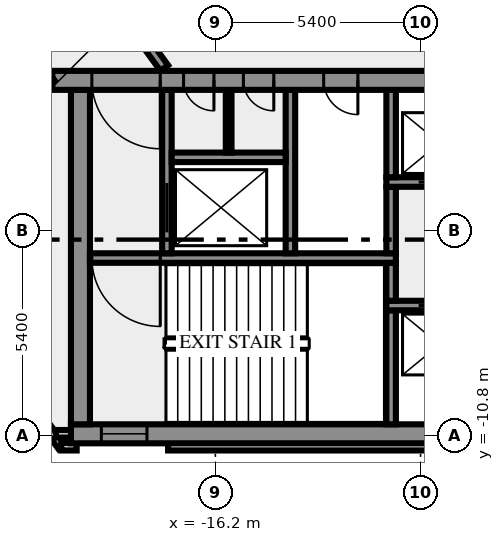
"""IFC4 building model, lengths in metres.
Left out: names, types, materials, properties, quantities, classifications, styles, units other than length and angle.
Written with IfcOpenShell. Run it as: python <this file> out.ifc"""

import sys

from ifc_helpers import new_model, si_unit, direction, frame, frame_2d, origin, place, context, subcontext, project, spatial, rectangle, extrude, element, fill, save


model = new_model("IFC4")
c1 = context("Model", 3, precision=1e-05, world=origin(), true_north=direction((0.0, 1.0)))
c2 = subcontext(c1, "Body", "Model", "MODEL_VIEW")
j1 = project(units=[si_unit("LENGTHUNIT", "METRE"), si_unit("PLANEANGLEUNIT", "RADIAN")], contexts=[c1])
p1 = place(None, origin())
s1 = spatial("IfcSite", under=j1, at=p1, CompositionType="ELEMENT")
p2 = place(p1, origin())
s2 = spatial("IfcBuilding", under=s1, at=p2, CompositionType="ELEMENT")
p3 = place(p2, frame((0.0, 0.0, 20.5)))
s3 = spatial("IfcBuildingStorey", under=s2, at=p3, CompositionType="ELEMENT", Elevation=20.5)
p4 = place(p3, frame((-21.833, -8.909, 0.0), z_axis=(0.0, 0.0, 1.0), x_axis=(0.587766567315, -0.809030569476, 0.0)))
e1 = element("IfcWall", 1, at=p4, inside=s3, PredefinedType="SOLIDWALL", context=c2, shape_type="SweptSolid", body=[
    extrude(rectangle(XDim=2.688, YDim=0.2, at=frame_2d((1.344, 0.0))), origin(), (0.0, 0.0, 1.0), 3.9),
])
p5 = place(p3, frame((-20.256, -11.088, 0.0), z_axis=(0.0, 0.0, 1.0), x_axis=(1.0, 0.0, 0.0)))
e2 = element("IfcWall", 2, at=p5, inside=s3, PredefinedType="SOLIDWALL", context=c2, shape_type="SweptSolid", body=[
    extrude(rectangle(XDim=0.406, YDim=0.2, at=frame_2d((0.203, 0.0))), origin(), (0.0, 0.0, 1.0), 3.9),
])
p6 = place(p3, frame((-17.444, -11.088, 0.0), z_axis=(0.0, 0.0, 1.0), x_axis=(1.0, 0.0, 0.0)))
e3 = element("IfcWall", 3, at=p6, inside=s3, PredefinedType="SOLIDWALL", context=c2, shape_type="SweptSolid", body=[
    extrude(rectangle(XDim=34.888, YDim=0.2, at=frame_2d((17.444, 0.0))), origin(), (0.0, 0.0, 1.0), 3.9),
])
p7 = place(p3, frame((-19.98, -10.75, 0.0), z_axis=(0.0, 0.0, 1.0), x_axis=(-1.0, 0.0, 0.0)))
e4 = element("IfcWall", 4, at=p7, inside=s3, PredefinedType="SOLIDWALL", context=c2, shape_type="SweptSolid", body=[
    extrude(rectangle(XDim=0.417, YDim=0.2, at=frame_2d((0.208, 0.0))), origin(), (0.0, 0.0, 1.0), 3.9),
])
p8 = place(p3, frame((-20.0, -10.75, 0.0), z_axis=(0.0, 0.0, 1.0), x_axis=(1.0, 0.0, 0.0)))
e5 = element("IfcWall", 5, at=p8, inside=s3, PredefinedType="SHEAR", context=c2, shape_type="SweptSolid", body=[
    extrude(rectangle(XDim=40.0, YDim=0.5, at=frame_2d((20.0, 0.0))), origin(), (0.0, 0.0, 1.0), 3.9),
])
p9 = place(p8, frame((0.8, 0.0, 1.0)))
e6 = element("IfcOpeningElement", 6, at=p9, cuts=e5, PredefinedType="OPENING", context=c2, shape_type="SweptSolid", body=[
    extrude(rectangle(XDim=1.2, YDim=1.2, at=frame_2d((0.6, 0.6))), frame((0.0, 0.26, 0.0), z_axis=(0.0, -1.0, 0.0), x_axis=(1.0, 0.0, 0.0)), (0.0, 0.0, 1.0), 0.52),
])
p10 = place(p8, frame((38.0, 0.0, 1.0)))
e7 = element("IfcOpeningElement", 7, at=p10, cuts=e5, PredefinedType="OPENING", context=c2, shape_type="SweptSolid", body=[
    extrude(rectangle(XDim=1.2, YDim=1.2, at=frame_2d((0.6, 0.6))), frame((0.0, 0.26, 0.0), z_axis=(0.0, -1.0, 0.0), x_axis=(1.0, 0.0, 0.0)), (0.0, 0.0, 1.0), 0.52),
])
p11 = place(p3, frame((-19.75, -10.5, 0.0), z_axis=(0.0, 0.0, 1.0), x_axis=(0.0, 1.0, 0.0)))
e8 = element("IfcWall", 8, at=p11, inside=s3, PredefinedType="SHEAR", context=c2, shape_type="SweptSolid", body=[
    extrude(rectangle(XDim=8.8, YDim=0.5, at=frame_2d((4.4, 0.0))), origin(), (0.0, 0.0, 1.0), 3.9),
])
p12 = place(p3, frame((-11.575, -10.5, 0.0), z_axis=(0.0, 0.0, 1.0), x_axis=(0.0, 1.0, 0.0)))
e9 = element("IfcWall", 9, at=p12, inside=s3, PredefinedType="SHEAR", context=c2, shape_type="SweptSolid", body=[
    extrude(rectangle(XDim=3.0, YDim=0.25, at=frame_2d((1.5, 0.0))), origin(), (0.0, 0.0, 1.0), 3.9),
])
p13 = place(p3, frame((11.7, -7.375, 0.0), z_axis=(0.0, 0.0, 1.0), x_axis=(-1.0, 0.0, 0.0)))
e10 = element("IfcWall", 10, at=p13, inside=s3, PredefinedType="SHEAR", context=c2, shape_type="SweptSolid", body=[
    extrude(rectangle(XDim=23.4, YDim=0.25, at=frame_2d((11.7, 0.0))), origin(), (0.0, 0.0, 1.0), 3.9),
])
p14 = place(p13, frame((21.45, 0.0, 0.0)))
e11 = element("IfcOpeningElement", 11, at=p14, cuts=e10, PredefinedType="OPENING", context=c2, shape_type="SweptSolid", body=[
    extrude(rectangle(XDim=1.1, YDim=2.1, at=frame_2d((0.55, 1.05))), frame((0.0, 0.135, 0.0), z_axis=(0.0, -1.0, 0.0), x_axis=(1.0, 0.0, 0.0)), (0.0, 0.0, 1.0), 0.27),
])
p15 = place(p13, frame((18.95, 0.0, 0.0)))
e12 = element("IfcOpeningElement", 12, at=p15, cuts=e10, PredefinedType="OPENING", context=c2, shape_type="SweptSolid", body=[
    extrude(rectangle(XDim=1.1, YDim=2.1, at=frame_2d((0.55, 1.05))), frame((0.0, 0.135, 0.0), z_axis=(0.0, -1.0, 0.0), x_axis=(1.0, 0.0, 0.0)), (0.0, 0.0, 1.0), 0.27),
])
p16 = place(p13, frame((16.45, 0.0, 0.0)))
e13 = element("IfcOpeningElement", 13, at=p16, cuts=e10, PredefinedType="OPENING", context=c2, shape_type="SweptSolid", body=[
    extrude(rectangle(XDim=1.1, YDim=2.1, at=frame_2d((0.55, 1.05))), frame((0.0, 0.135, 0.0), z_axis=(0.0, -1.0, 0.0), x_axis=(1.0, 0.0, 0.0)), (0.0, 0.0, 1.0), 0.27),
])
p17 = place(p13, frame((14.5, 0.0, 0.0)))
e14 = element("IfcOpeningElement", 14, at=p17, cuts=e10, PredefinedType="OPENING", context=c2, shape_type="SweptSolid", body=[
    extrude(rectangle(XDim=0.9, YDim=2.1, at=frame_2d((0.45, 1.05))), frame((0.0, 0.135, 0.0), z_axis=(0.0, -1.0, 0.0), x_axis=(1.0, 0.0, 0.0)), (0.0, 0.0, 1.0), 0.27),
])
p18 = place(p13, frame((12.95, 0.0, 0.0)))
e15 = element("IfcOpeningElement", 15, at=p18, cuts=e10, PredefinedType="OPENING", context=c2, shape_type="SweptSolid", body=[
    extrude(rectangle(XDim=0.9, YDim=2.1, at=frame_2d((0.45, 1.05))), frame((0.0, 0.135, 0.0), z_axis=(0.0, -1.0, 0.0), x_axis=(1.0, 0.0, 0.0)), (0.0, 0.0, 1.0), 0.27),
])
p19 = place(p13, frame((11.475, 0.0, 0.0)))
e16 = element("IfcOpeningElement", 16, at=p19, cuts=e10, PredefinedType="OPENING", context=c2, shape_type="SweptSolid", body=[
    extrude(rectangle(XDim=0.9, YDim=2.1, at=frame_2d((0.45, 1.05))), frame((0.0, 0.135, 0.0), z_axis=(0.0, -1.0, 0.0), x_axis=(1.0, 0.0, 0.0)), (0.0, 0.0, 1.0), 0.27),
])
p20 = place(p13, frame((10.45, 0.0, 0.0)))
e17 = element("IfcOpeningElement", 17, at=p20, cuts=e10, PredefinedType="OPENING", context=c2, shape_type="SweptSolid", body=[
    extrude(rectangle(XDim=0.5, YDim=2.1, at=frame_2d((0.25, 1.05))), frame((0.0, 0.135, 0.0), z_axis=(0.0, -1.0, 0.0), x_axis=(1.0, 0.0, 0.0)), (0.0, 0.0, 1.0), 0.27),
])
p21 = place(p3, frame((-11.575, -7.25, 0.0), z_axis=(0.0, 0.0, 1.0), x_axis=(0.0, 1.0, 0.0)))
e18 = element("IfcWall", 18, at=p21, inside=s3, PredefinedType="SHEAR", context=c2, shape_type="SweptSolid", body=[
    extrude(rectangle(XDim=1.0, YDim=0.25, at=frame_2d((0.5, 0.0))), origin(), (0.0, 0.0, 1.0), 3.9),
])
p22 = place(p3, frame((-11.45, -6.125, 0.0), z_axis=(0.0, 0.0, 1.0), x_axis=(-1.0, 0.0, 0.0)))
e19 = element("IfcWall", 19, at=p22, inside=s3, PredefinedType="SHEAR", context=c2, shape_type="SweptSolid", body=[
    extrude(rectangle(XDim=8.05, YDim=0.25, at=frame_2d((4.025, 0.0))), origin(), (0.0, 0.0, 1.0), 3.9),
])
p23 = place(p22, frame((6.2, 0.0, 0.0)))
e20 = element("IfcOpeningElement", 20, at=p23, cuts=e19, PredefinedType="OPENING", context=c2, shape_type="SweptSolid", body=[
    extrude(rectangle(XDim=1.8, YDim=2.1, at=frame_2d((0.9, 1.05))), frame((0.0, 0.135, 0.0), z_axis=(0.0, -1.0, 0.0), x_axis=(1.0, 0.0, 0.0)), (0.0, 0.0, 1.0), 0.27),
])
p24 = place(p3, frame((-17.475, -6.0, 0.0), z_axis=(0.0, 0.0, 1.0), x_axis=(0.0, 1.0, 0.0)))
e21 = element("IfcWall", 21, at=p24, inside=s3, PredefinedType="SHEAR", context=c2, shape_type="SweptSolid", body=[
    extrude(rectangle(XDim=4.3, YDim=0.25, at=frame_2d((2.15, 0.0))), origin(), (0.0, 0.0, 1.0), 3.9),
])
p25 = place(p24, frame((0.55, 0.0, 0.0)))
e22 = element("IfcOpeningElement", 22, at=p25, cuts=e21, PredefinedType="OPENING", context=c2, shape_type="SweptSolid", body=[
    extrude(rectangle(XDim=1.3, YDim=2.1, at=frame_2d((0.65, 1.05))), frame((0.0, 0.135, 0.0), z_axis=(0.0, -1.0, 0.0), x_axis=(1.0, 0.0, 0.0)), (0.0, 0.0, 1.0), 0.27),
])
p26 = place(p3, frame((-14.225, -6.0, 0.0), z_axis=(0.0, 0.0, 1.0), x_axis=(0.0, 1.0, 0.0)))
e23 = element("IfcWall", 23, at=p26, inside=s3, PredefinedType="SHEAR", context=c2, shape_type="SweptSolid", body=[
    extrude(rectangle(XDim=4.3, YDim=0.25, at=frame_2d((2.15, 0.0))), origin(), (0.0, 0.0, 1.0), 3.9),
])
p27 = place(p3, frame((-11.575, -6.0, 0.0), z_axis=(0.0, 0.0, 1.0), x_axis=(0.0, 1.0, 0.0)))
e24 = element("IfcWall", 24, at=p27, inside=s3, PredefinedType="SHEAR", context=c2, shape_type="SweptSolid", body=[
    extrude(rectangle(XDim=1.75, YDim=0.25, at=frame_2d((0.875, 0.0))), origin(), (0.0, 0.0, 1.0), 3.9),
])
p28 = place(p3, frame((-11.7, -4.125, 0.0), z_axis=(0.0, 0.0, 1.0), x_axis=(1.0, 0.0, 0.0)))
e25 = element("IfcWall", 25, at=p28, inside=s3, PredefinedType="SHEAR", context=c2, shape_type="SweptSolid", body=[
    extrude(rectangle(XDim=10.05, YDim=0.25, at=frame_2d((5.025, 0.0))), origin(), (0.0, 0.0, 1.0), 3.9),
])
p29 = place(p28, frame((0.85, 0.0, 0.0)))
e26 = element("IfcOpeningElement", 26, at=p29, cuts=e25, PredefinedType="OPENING", context=c2, shape_type="SweptSolid", body=[
    extrude(rectangle(XDim=1.1, YDim=2.1, at=frame_2d((0.55, 1.05))), frame((0.0, 0.135, 0.0), z_axis=(0.0, -1.0, 0.0), x_axis=(1.0, 0.0, 0.0)), (0.0, 0.0, 1.0), 0.27),
])
p30 = place(p28, frame((3.35, 0.0, 0.0)))
e27 = element("IfcOpeningElement", 27, at=p30, cuts=e25, PredefinedType="OPENING", context=c2, shape_type="SweptSolid", body=[
    extrude(rectangle(XDim=1.1, YDim=2.1, at=frame_2d((0.55, 1.05))), frame((0.0, 0.135, 0.0), z_axis=(0.0, -1.0, 0.0), x_axis=(1.0, 0.0, 0.0)), (0.0, 0.0, 1.0), 0.27),
])
p31 = place(p28, frame((5.85, 0.0, 0.0)))
e28 = element("IfcOpeningElement", 28, at=p31, cuts=e25, PredefinedType="OPENING", context=c2, shape_type="SweptSolid", body=[
    extrude(rectangle(XDim=1.1, YDim=2.1, at=frame_2d((0.55, 1.05))), frame((0.0, 0.135, 0.0), z_axis=(0.0, -1.0, 0.0), x_axis=(1.0, 0.0, 0.0)), (0.0, 0.0, 1.0), 0.27),
])
p32 = place(p3, frame((-11.575, -4.0, 0.0), z_axis=(0.0, 0.0, 1.0), x_axis=(0.0, 1.0, 0.0)))
e29 = element("IfcWall", 29, at=p32, inside=s3, PredefinedType="SHEAR", context=c2, shape_type="SweptSolid", body=[
    extrude(rectangle(XDim=2.3, YDim=0.25, at=frame_2d((1.15, 0.0))), origin(), (0.0, 0.0, 1.0), 3.9),
])
p33 = place(p3, frame((-17.35, -3.475, 0.0), z_axis=(0.0, 0.0, 1.0), x_axis=(1.0, 0.0, 0.0)))
e30 = element("IfcWall", 30, at=p33, inside=s3, PredefinedType="SHEAR", context=c2, shape_type="SweptSolid", body=[
    extrude(rectangle(XDim=3.0, YDim=0.25, at=frame_2d((1.5, 0.0))), origin(), (0.0, 0.0, 1.0), 3.9),
])
p34 = place(p3, frame((-15.85, -3.35, 0.0), z_axis=(0.0, 0.0, 1.0), x_axis=(0.0, 1.0, 0.0)))
e31 = element("IfcWall", 31, at=p34, inside=s3, PredefinedType="PARTITIONING", context=c2, shape_type="SweptSolid", body=[
    extrude(rectangle(XDim=1.65, YDim=0.15, at=frame_2d((0.825, 0.0))), origin(), (0.0, 0.0, 1.0), 3.9),
])
p35 = place(p3, frame((20.49, -1.45, 0.0), z_axis=(0.0, 0.0, 1.0), x_axis=(-1.0, 0.0, 0.0)))
e32 = element("IfcWall", 32, at=p35, inside=s3, PredefinedType="SHEAR", context=c2, shape_type="SweptSolid", body=[
    extrude(rectangle(XDim=40.98, YDim=0.5, at=frame_2d((20.49, 0.0))), origin(), (0.0, 0.0, 1.0), 3.9),
])
p36 = place(p35, frame((38.14, 0.0, 0.0)))
e33 = element("IfcOpeningElement", 33, at=p36, cuts=e32, PredefinedType="OPENING", context=c2, shape_type="SweptSolid", body=[
    extrude(rectangle(XDim=1.8, YDim=2.1, at=frame_2d((0.9, 1.05))), frame((0.0, 0.26, 0.0), z_axis=(0.0, -1.0, 0.0), x_axis=(1.0, 0.0, 0.0)), (0.0, 0.0, 1.0), 0.52),
])
p37 = place(p35, frame((36.728, 0.0, 0.0)))
e34 = element("IfcOpeningElement", 34, at=p37, cuts=e32, PredefinedType="OPENING", context=c2, shape_type="SweptSolid", body=[
    extrude(rectangle(XDim=0.8, YDim=2.1, at=frame_2d((0.4, 1.05))), frame((0.0, 0.26, 0.0), z_axis=(0.0, -1.0, 0.0), x_axis=(1.0, 0.0, 0.0)), (0.0, 0.0, 1.0), 0.52),
])
p38 = place(p35, frame((35.153, 0.0, 0.0)))
e35 = element("IfcOpeningElement", 35, at=p38, cuts=e32, PredefinedType="OPENING", context=c2, shape_type="SweptSolid", body=[
    extrude(rectangle(XDim=0.8, YDim=2.1, at=frame_2d((0.4, 1.05))), frame((0.0, 0.26, 0.0), z_axis=(0.0, -1.0, 0.0), x_axis=(1.0, 0.0, 0.0)), (0.0, 0.0, 1.0), 0.52),
])
p39 = place(p35, frame((32.94, 0.0, 0.0)))
e36 = element("IfcOpeningElement", 36, at=p39, cuts=e32, PredefinedType="OPENING", context=c2, shape_type="SweptSolid", body=[
    extrude(rectangle(XDim=0.9, YDim=2.1, at=frame_2d((0.45, 1.05))), frame((0.0, 0.26, 0.0), z_axis=(0.0, -1.0, 0.0), x_axis=(1.0, 0.0, 0.0)), (0.0, 0.0, 1.0), 0.52),
])
p40 = place(p35, frame((19.59, 0.0, 0.0)))
e37 = element("IfcOpeningElement", 37, at=p40, cuts=e32, PredefinedType="OPENING", context=c2, shape_type="SweptSolid", body=[
    extrude(rectangle(XDim=2.0, YDim=2.1, at=frame_2d((1.0, 1.05))), frame((0.0, 0.26, 0.0), z_axis=(0.0, -1.0, 0.0), x_axis=(1.0, 0.0, 0.0)), (0.0, 0.0, 1.0), 0.52),
])
p41 = place(p35, frame((7.14, 0.0, 0.0)))
e38 = element("IfcOpeningElement", 38, at=p41, cuts=e32, PredefinedType="OPENING", context=c2, shape_type="SweptSolid", body=[
    extrude(rectangle(XDim=0.9, YDim=2.1, at=frame_2d((0.45, 1.05))), frame((0.0, 0.26, 0.0), z_axis=(0.0, -1.0, 0.0), x_axis=(1.0, 0.0, 0.0)), (0.0, 0.0, 1.0), 0.52),
])
p42 = place(p35, frame((4.19, 0.0, 0.0)))
e39 = element("IfcOpeningElement", 39, at=p42, cuts=e32, PredefinedType="OPENING", context=c2, shape_type="SweptSolid", body=[
    extrude(rectangle(XDim=0.9, YDim=2.1, at=frame_2d((0.45, 1.05))), frame((0.0, 0.26, 0.0), z_axis=(0.0, -1.0, 0.0), x_axis=(1.0, 0.0, 0.0)), (0.0, 0.0, 1.0), 0.52),
])
p43 = place(p35, frame((1.04, 0.0, 0.0)))
e40 = element("IfcOpeningElement", 40, at=p43, cuts=e32, PredefinedType="OPENING", context=c2, shape_type="SweptSolid", body=[
    extrude(rectangle(XDim=1.8, YDim=2.1, at=frame_2d((0.9, 1.05))), frame((0.0, 0.26, 0.0), z_axis=(0.0, -1.0, 0.0), x_axis=(1.0, 0.0, 0.0)), (0.0, 0.0, 1.0), 0.52),
])
p44 = place(p3, frame((-20.531, -1.523, 0.0), z_axis=(0.0, 0.0, 1.0), x_axis=(-0.587784522481, 0.809017524614, 0.0)))
e41 = element("IfcWall", 41, at=p44, inside=s3, PredefinedType="SOLIDWALL", context=c2, shape_type="SweptSolid", body=[
    extrude(rectangle(XDim=49.912, YDim=0.25, at=frame_2d((24.956, 0.0))), origin(), (0.0, 0.0, 1.0), 3.9),
])
p45 = place(p44, frame((30.765, 0.0, 0.0)))
e42 = element("IfcOpeningElement", 42, at=p45, cuts=e41, PredefinedType="OPENING", context=c2, shape_type="SweptSolid", body=[
    extrude(rectangle(XDim=0.9, YDim=2.1, at=frame_2d((0.45, 1.05))), frame((0.0, 0.135, 0.0), z_axis=(0.0, -1.0, 0.0), x_axis=(1.0, 0.0, 0.0)), (0.0, 0.0, 1.0), 0.27),
])
p46 = place(p44, frame((0.533, 0.0, 0.0)))
e43 = element("IfcOpeningElement", 43, at=p46, cuts=e41, PredefinedType="OPENING", context=c2, shape_type="SweptSolid", body=[
    extrude(rectangle(XDim=0.9, YDim=2.1, at=frame_2d((0.45, 1.05))), frame((0.0, 0.135, 0.0), z_axis=(0.0, -1.0, 0.0), x_axis=(1.0, 0.0, 0.0)), (0.0, 0.0, 1.0), 0.27),
])
p47 = place(p44, frame((22.416, 0.0, 0.0)))
e44 = element("IfcOpeningElement", 44, at=p47, cuts=e41, PredefinedType="OPENING", context=c2, shape_type="SweptSolid", body=[
    extrude(rectangle(XDim=0.9, YDim=2.1, at=frame_2d((0.45, 1.05))), frame((0.0, 0.135, 0.0), z_axis=(0.0, -1.0, 0.0), x_axis=(1.0, 0.0, 0.0)), (0.0, 0.0, 1.0), 0.27),
])
p48 = place(p44, frame((11.866, 0.0, 0.0)))
e45 = element("IfcOpeningElement", 45, at=p48, cuts=e41, PredefinedType="OPENING", context=c2, shape_type="SweptSolid", body=[
    extrude(rectangle(XDim=0.9, YDim=2.1, at=frame_2d((0.45, 1.05))), frame((0.0, 0.135, 0.0), z_axis=(0.0, -1.0, 0.0), x_axis=(1.0, 0.0, 0.0)), (0.0, 0.0, 1.0), 0.27),
])
p49 = place(p44, frame((29.166, 0.0, 0.0)))
e46 = element("IfcOpeningElement", 46, at=p49, cuts=e41, PredefinedType="OPENING", context=c2, shape_type="SweptSolid", body=[
    extrude(rectangle(XDim=0.9, YDim=2.1, at=frame_2d((0.45, 1.05))), frame((0.0, 0.135, 0.0), z_axis=(0.0, -1.0, 0.0), x_axis=(1.0, 0.0, 0.0)), (0.0, 0.0, 1.0), 0.27),
])
p50 = place(p3, frame((-37.232, 25.972, 0.0), z_axis=(0.0, 0.0, 1.0), x_axis=(0.587786323093, -0.809016216391, 0.0)))
e47 = element("IfcWall", 47, at=p50, inside=s3, PredefinedType="SOLIDWALL", context=c2, shape_type="SweptSolid", body=[
    extrude(rectangle(XDim=33.493, YDim=0.25, at=frame_2d((16.747, 0.0))), origin(), (0.0, 0.0, 1.0), 3.9),
])
p51 = place(p50, frame((10.685, 0.0, 0.0)))
e48 = element("IfcOpeningElement", 48, at=p51, cuts=e47, PredefinedType="OPENING", context=c2, shape_type="SweptSolid", body=[
    extrude(rectangle(XDim=1.0, YDim=2.1, at=frame_2d((0.5, 1.05))), frame((0.0, 0.135, 0.0), z_axis=(0.0, -1.0, 0.0), x_axis=(1.0, 0.0, 0.0)), (0.0, 0.0, 1.0), 0.27),
])
p52 = place(p50, frame((29.152, 0.0, 0.0)))
e49 = element("IfcOpeningElement", 49, at=p52, cuts=e47, PredefinedType="OPENING", context=c2, shape_type="SweptSolid", body=[
    extrude(rectangle(XDim=0.9, YDim=2.1, at=frame_2d((0.45, 1.05))), frame((0.0, 0.135, 0.0), z_axis=(0.0, -1.0, 0.0), x_axis=(1.0, 0.0, 0.0)), (0.0, 0.0, 1.0), 0.27),
])
p53 = place(p50, frame((12.385, 0.0, 0.0)))
e50 = element("IfcOpeningElement", 50, at=p53, cuts=e47, PredefinedType="OPENING", context=c2, shape_type="SweptSolid", body=[
    extrude(rectangle(XDim=0.9, YDim=2.1, at=frame_2d((0.45, 1.05))), frame((0.0, 0.135, 0.0), z_axis=(0.0, -1.0, 0.0), x_axis=(1.0, 0.0, 0.0)), (0.0, 0.0, 1.0), 0.27),
])
p54 = place(p9, origin())
e51 = element("IfcWindow", 51, at=p54, inside=s3, PartitioningType="SINGLE_PANEL", PredefinedType="WINDOW", context=c2, shape_type="SweptSolid", body=[
    extrude(rectangle(XDim=1.2, YDim=1.2, at=frame_2d((0.6, 0.6))), frame((0.0, 0.03, 0.0), z_axis=(0.0, -1.0, 0.0), x_axis=(1.0, 0.0, 0.0)), (0.0, 0.0, 1.0), 0.06),
])
fill(e6, e51)
p55 = place(p14, origin())
e52 = element("IfcDoor", 52, at=p55, inside=s3, OperationType="DOUBLE_DOOR_SLIDING", PredefinedType="DOOR", context=c2, shape_type="SweptSolid", body=[
    extrude(rectangle(XDim=1.1, YDim=2.1, at=frame_2d((0.55, 1.05))), frame((0.0, 0.025, 0.0), z_axis=(0.0, -1.0, 0.0), x_axis=(1.0, 0.0, 0.0)), (0.0, 0.0, 1.0), 0.05),
])
fill(e11, e52)
p56 = place(p23, origin())
e53 = element("IfcDoor", 53, at=p56, inside=s3, OperationType="DOUBLE_DOOR_SINGLE_SWING", PredefinedType="DOOR", context=c2, shape_type="SweptSolid", body=[
    extrude(rectangle(XDim=1.8, YDim=2.1, at=frame_2d((0.9, 1.05))), frame((0.0, 0.025, 0.0), z_axis=(0.0, -1.0, 0.0), x_axis=(1.0, 0.0, 0.0)), (0.0, 0.0, 1.0), 0.05),
])
fill(e20, e53)
p57 = place(p25, origin())
e54 = element("IfcDoor", 54, at=p57, inside=s3, OperationType="DOUBLE_DOOR_SLIDING", PredefinedType="DOOR", context=c2, shape_type="SweptSolid", body=[
    extrude(rectangle(XDim=1.3, YDim=2.1, at=frame_2d((0.65, 1.05))), frame((0.0, 0.025, 0.0), z_axis=(0.0, -1.0, 0.0), x_axis=(1.0, 0.0, 0.0)), (0.0, 0.0, 1.0), 0.05),
])
fill(e22, e54)
p58 = place(p29, origin())
e55 = element("IfcDoor", 55, at=p58, inside=s3, OperationType="DOUBLE_DOOR_SLIDING", PredefinedType="DOOR", context=c2, shape_type="SweptSolid", body=[
    extrude(rectangle(XDim=1.1, YDim=2.1, at=frame_2d((0.55, 1.05))), frame((0.0, 0.025, 0.0), z_axis=(0.0, -1.0, 0.0), x_axis=(1.0, 0.0, 0.0)), (0.0, 0.0, 1.0), 0.05),
])
fill(e26, e55)
p59 = place(p36, origin())
e56 = element("IfcDoor", 56, at=p59, inside=s3, OperationType="DOUBLE_DOOR_SINGLE_SWING", PredefinedType="DOOR", context=c2, shape_type="SweptSolid", body=[
    extrude(rectangle(XDim=1.8, YDim=2.1, at=frame_2d((0.9, 1.05))), frame((0.0, 0.025, 0.0), z_axis=(0.0, -1.0, 0.0), x_axis=(1.0, 0.0, 0.0)), (0.0, 0.0, 1.0), 0.05),
])
fill(e33, e56)
p60 = place(p37, origin())
e57 = element("IfcDoor", 57, at=p60, inside=s3, OperationType="SINGLE_SWING_RIGHT", PredefinedType="DOOR", context=c2, shape_type="SweptSolid", body=[
    extrude(rectangle(XDim=0.8, YDim=2.1, at=frame_2d((0.4, 1.05))), frame((0.0, 0.025, 0.0), z_axis=(0.0, -1.0, 0.0), x_axis=(1.0, 0.0, 0.0)), (0.0, 0.0, 1.0), 0.05),
])
fill(e34, e57)
p61 = place(p38, origin())
e58 = element("IfcDoor", 58, at=p61, inside=s3, OperationType="SINGLE_SWING_RIGHT", PredefinedType="DOOR", context=c2, shape_type="SweptSolid", body=[
    extrude(rectangle(XDim=0.8, YDim=2.1, at=frame_2d((0.4, 1.05))), frame((0.0, 0.025, 0.0), z_axis=(0.0, -1.0, 0.0), x_axis=(1.0, 0.0, 0.0)), (0.0, 0.0, 1.0), 0.05),
])
fill(e35, e58)
p62 = place(p39, origin())
e59 = element("IfcDoor", 59, at=p62, inside=s3, OperationType="SINGLE_SWING_RIGHT", PredefinedType="DOOR", context=c2, shape_type="SweptSolid", body=[
    extrude(rectangle(XDim=0.9, YDim=2.1, at=frame_2d((0.45, 1.05))), frame((0.0, 0.025, 0.0), z_axis=(0.0, -1.0, 0.0), x_axis=(1.0, 0.0, 0.0)), (0.0, 0.0, 1.0), 0.05),
])
fill(e36, e59)
save(model, sys.argv[1])
